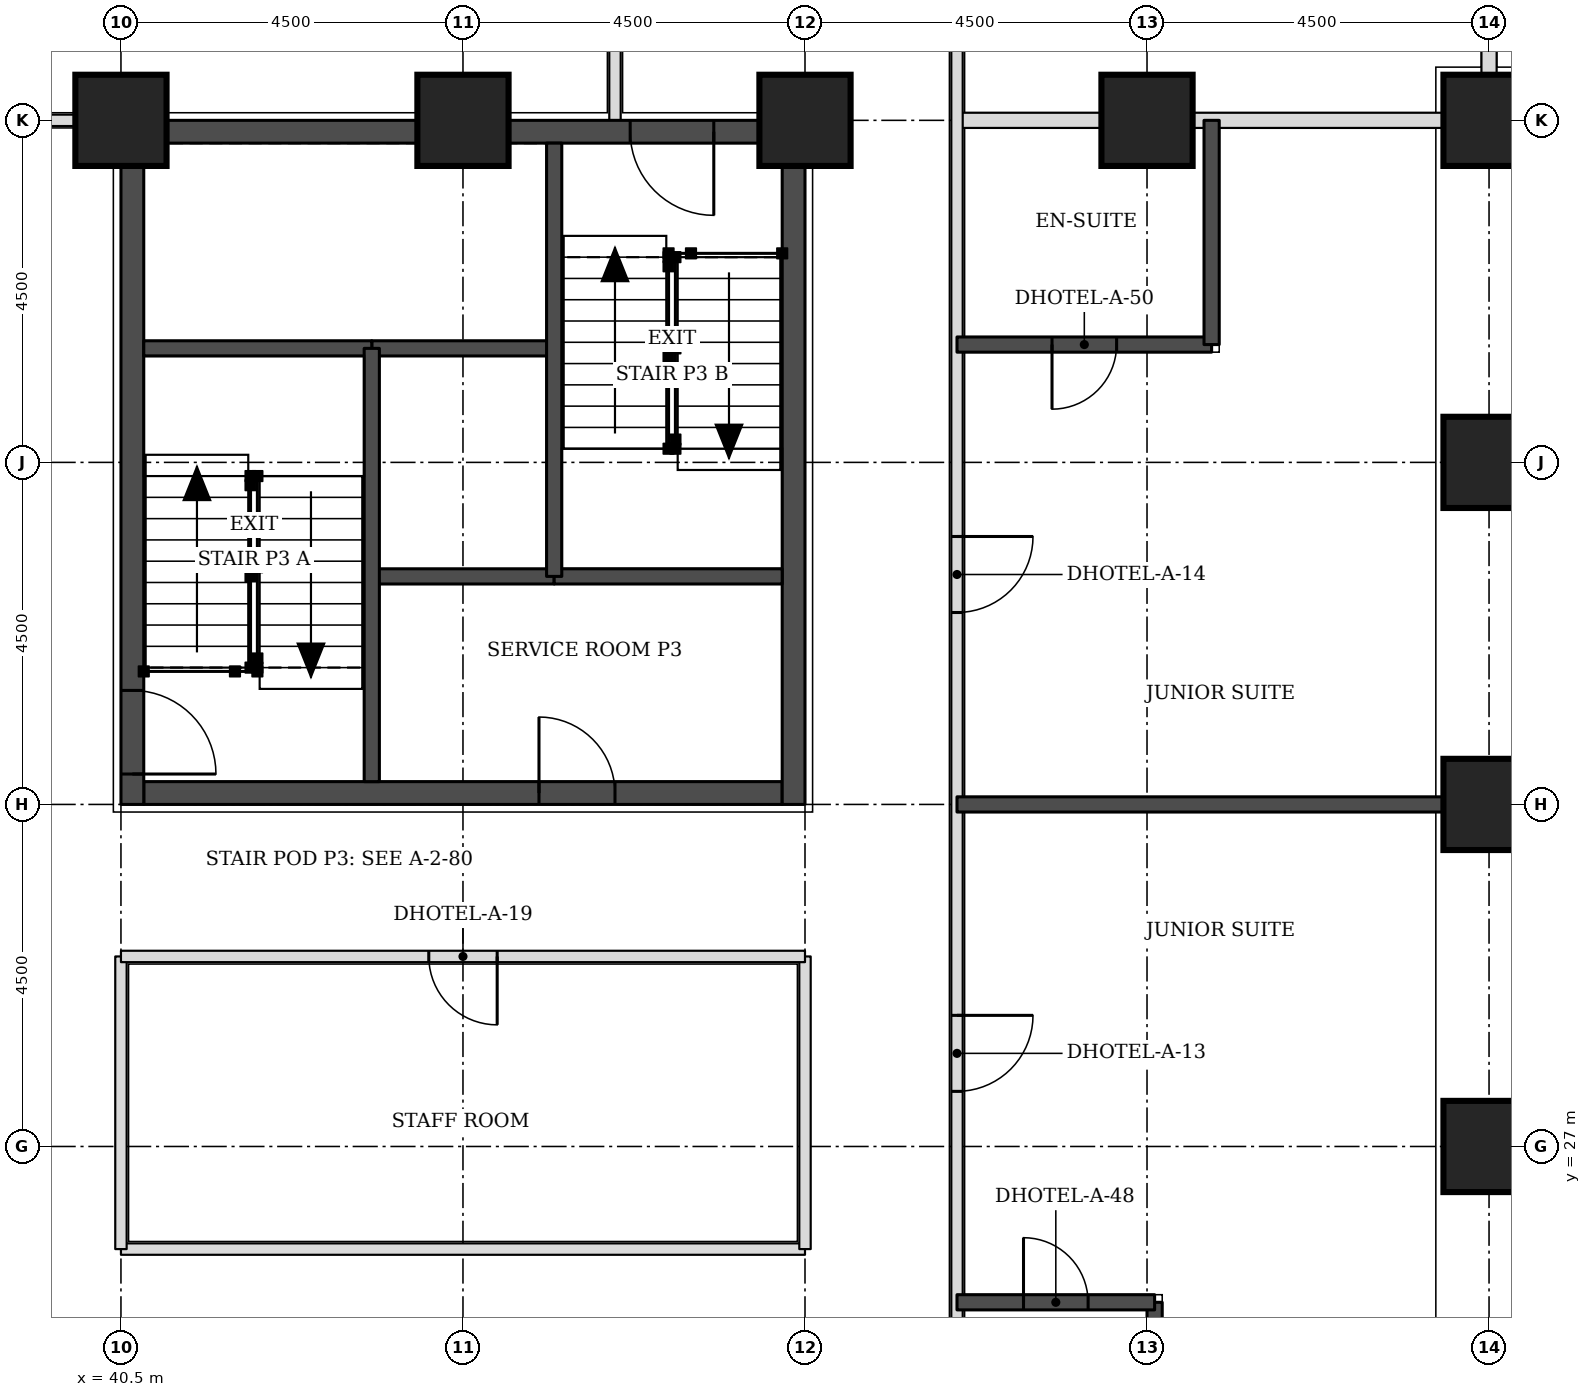
"""IFC4 building model, lengths in metres.
Left out: names, types, materials, properties, quantities, classifications, styles, units other than length and angle.
Written with IfcOpenShell. Run it as: python <this file> out.ifc"""

import sys

from ifc_helpers import new_model, si_unit, direction, frame, frame_2d, origin, origin_2d, place, context, subcontext, project, spatial, rectangle, extrude, element, fill, save


model = new_model("IFC4")
c1 = context("Model", 3, precision=1e-05, world=origin(), true_north=direction((0.0, 1.0)))
c2 = subcontext(c1, "Body", "Model", "MODEL_VIEW")
j1 = project(units=[si_unit("LENGTHUNIT", "METRE"), si_unit("PLANEANGLEUNIT", "RADIAN")], contexts=[c1])
p1 = place(None, origin())
s1 = spatial("IfcSite", under=j1, at=p1, CompositionType="ELEMENT")
p2 = place(p1, origin())
s2 = spatial("IfcBuilding", under=s1, at=p2, CompositionType="ELEMENT")
p3 = place(p2, frame((0.0, 0.0, 49.5)))
s3 = spatial("IfcBuildingStorey", under=s2, at=p3, CompositionType="ELEMENT", Elevation=49.5)
for number, where, z_axis, x_axis in (
    (1, (58.5, 27.0, 0.0), (0.0, 0.0, 1.0), (1.0, 0.0, 0.0)),
    (2, (58.5, 31.5, 0.0), (0.0, 0.0, 1.0), (1.0, 0.0, 0.0)),
    (3, (58.5, 36.0, 0.0), (0.0, 0.0, 1.0), (1.0, 0.0, 0.0)),
    (4, (40.5, 40.5, 0.0), (0.0, 0.0, 1.0), (1.0, 0.0, 0.0)),
    (5, (45.0, 40.5, 0.0), (0.0, 0.0, 1.0), (1.0, 0.0, 0.0)),
    (6, (49.5, 40.5, 0.0), (0.0, 0.0, 1.0), (1.0, 0.0, 0.0)),
    (7, (54.0, 40.5, 0.0), (0.0, 0.0, 1.0), (1.0, 0.0, 0.0)),
    (8, (58.5, 40.5, 0.0), (0.0, 0.0, 1.0), (1.0, 0.0, 0.0)),
):
    element("IfcColumn", number, at=place(p3, frame(where, z_axis=z_axis, x_axis=x_axis)), inside=s3, PredefinedType="COLUMN", context=c2, shape_type="SweptSolid", body=[
        extrude(rectangle(XDim=1.2, YDim=1.2, at=origin_2d()), origin(), (0.0, 0.0, 1.0), 3.3),
    ])
p4 = place(p3, frame((40.8, 31.65, 0.0), z_axis=(0.0, 0.0, 1.0), x_axis=(1.0, 0.0, 0.0)))
e9 = element("IfcWall", 9, at=p4, inside=s3, PredefinedType="SHEAR", context=c2, shape_type="SweptSolid", body=[
    extrude(rectangle(XDim=8.4, YDim=0.3, at=frame_2d((4.2, 0.0))), origin(), (0.0, 0.0, 1.0), 3.3),
])
p5 = place(p4, frame((5.2, 0.0, 0.0)))
e10 = element("IfcOpeningElement", 10, at=p5, cuts=e9, PredefinedType="OPENING", context=c2, shape_type="SweptSolid", body=[
    extrude(rectangle(XDim=1.0, YDim=2.1, at=frame_2d((0.5, 1.05))), frame((0.0, 0.16, 0.0), z_axis=(0.0, -1.0, 0.0), x_axis=(1.0, 0.0, 0.0)), (0.0, 0.0, 1.0), 0.32),
])
p6 = place(p3, frame((40.8, 40.35, 0.0), z_axis=(0.0, 0.0, 1.0), x_axis=(1.0, 0.0, 0.0)))
e11 = element("IfcWall", 11, at=p6, inside=s3, PredefinedType="SHEAR", context=c2, shape_type="SweptSolid", body=[
    extrude(rectangle(XDim=8.4, YDim=0.3, at=frame_2d((4.2, 0.0))), origin(), (0.0, 0.0, 1.0), 3.3),
])
p7 = place(p6, frame((6.4, 0.0, 0.0)))
e12 = element("IfcOpeningElement", 12, at=p7, cuts=e11, PredefinedType="OPENING", context=c2, shape_type="SweptSolid", body=[
    extrude(rectangle(XDim=1.1, YDim=2.1, at=frame_2d((0.55, 1.05))), frame((0.0, 0.16, 0.0), z_axis=(0.0, -1.0, 0.0), x_axis=(1.0, 0.0, 0.0)), (0.0, 0.0, 1.0), 0.32),
])
p8 = place(p3, frame((40.65, 31.5, 0.0), z_axis=(0.0, 0.0, 1.0), x_axis=(0.0, 1.0, 0.0)))
e13 = element("IfcWall", 13, at=p8, inside=s3, PredefinedType="SHEAR", context=c2, shape_type="SweptSolid", body=[
    extrude(rectangle(XDim=9.0, YDim=0.3, at=frame_2d((4.5, 0.0))), origin(), (0.0, 0.0, 1.0), 3.3),
])
p9 = place(p8, frame((0.4, 0.0, 0.0)))
e14 = element("IfcOpeningElement", 14, at=p9, cuts=e13, PredefinedType="OPENING", context=c2, shape_type="SweptSolid", body=[
    extrude(rectangle(XDim=1.1, YDim=2.1, at=frame_2d((0.55, 1.05))), frame((0.0, 0.16, 0.0), z_axis=(0.0, -1.0, 0.0), x_axis=(1.0, 0.0, 0.0)), (0.0, 0.0, 1.0), 0.32),
])
p10 = place(p3, frame((49.35, 31.5, 0.0), z_axis=(0.0, 0.0, 1.0), x_axis=(0.0, 1.0, 0.0)))
e15 = element("IfcWall", 15, at=p10, inside=s3, PredefinedType="SHEAR", context=c2, shape_type="SweptSolid", body=[
    extrude(rectangle(XDim=9.0, YDim=0.3, at=frame_2d((4.5, 0.0))), origin(), (0.0, 0.0, 1.0), 3.3),
])
p11 = place(p3, frame((51.5, 40.5, 0.0), z_axis=(0.0, 0.0, 1.0), x_axis=(1.0, 0.0, 0.0)))
e16 = element("IfcWall", 16, at=p11, inside=s3, PredefinedType="PARTITIONING", context=c2, shape_type="SweptSolid", body=[
    extrude(rectangle(XDim=6.4, YDim=0.2, at=frame_2d((3.2, 0.0))), origin(), (0.0, 0.0, 1.0), 2.33),
])
p12 = place(p3, frame((58.5, 41.1, 0.0), z_axis=(0.0, 0.0, 1.0), x_axis=(0.0, 1.0, 0.0)))
e17 = element("IfcWall", 17, at=p12, inside=s3, PredefinedType="PARTITIONING", context=c2, shape_type="SweptSolid", body=[
    extrude(rectangle(XDim=6.4, YDim=0.2, at=frame_2d((3.2, 0.0))), origin(), (0.0, 0.0, 1.0), 3.08),
])
p13 = place(p3, frame((51.5, 23.65, 0.0), z_axis=(0.0, 0.0, 1.0), x_axis=(0.0, 1.0, 0.0)))
e18 = element("IfcWall", 18, at=p13, inside=s3, PredefinedType="PARTITIONING", context=c2, shape_type="SweptSolid", body=[
    extrude(rectangle(XDim=23.85, YDim=0.15, at=frame_2d((11.925, 0.0))), origin(), (0.0, 0.0, 1.0), 3.08),
])
p14 = place(p13, frame((4.075, 0.0, 0.0)))
e19 = element("IfcOpeningElement", 19, at=p14, cuts=e18, PredefinedType="OPENING", context=c2, shape_type="SweptSolid", body=[
    extrude(rectangle(XDim=1.0, YDim=2.1, at=frame_2d((0.5, 1.05))), frame((0.0, 0.085, 0.0), z_axis=(0.0, -1.0, 0.0), x_axis=(1.0, 0.0, 0.0)), (0.0, 0.0, 1.0), 0.17),
])
p15 = place(p13, frame((10.375, 0.0, 0.0)))
e20 = element("IfcOpeningElement", 20, at=p15, cuts=e18, PredefinedType="OPENING", context=c2, shape_type="SweptSolid", body=[
    extrude(rectangle(XDim=1.0, YDim=2.1, at=frame_2d((0.5, 1.05))), frame((0.0, 0.085, 0.0), z_axis=(0.0, -1.0, 0.0), x_axis=(1.0, 0.0, 0.0)), (0.0, 0.0, 1.0), 0.17),
])
p16 = place(p13, frame((19.9, 0.0, 0.0)))
e21 = element("IfcOpeningElement", 21, at=p16, cuts=e18, PredefinedType="OPENING", context=c2, shape_type="SweptSolid", body=[
    extrude(rectangle(XDim=0.9, YDim=2.1, at=frame_2d((0.45, 1.05))), frame((0.0, 0.085, 0.0), z_axis=(0.0, -1.0, 0.0), x_axis=(1.0, 0.0, 0.0)), (0.0, 0.0, 1.0), 0.17),
])
p17 = place(p3, frame((40.5, 25.65, 0.0), z_axis=(0.0, 0.0, 1.0), x_axis=(1.0, 0.0, 0.0)))
e22 = element("IfcWall", 22, at=p17, inside=s3, PredefinedType="PARTITIONING", context=c2, shape_type="SweptSolid", body=[
    extrude(rectangle(XDim=9.0, YDim=0.15, at=frame_2d((4.5, 0.0))), origin(), (0.0, 0.0, 1.0), 3.08),
])
for number, where, z_axis, x_axis in (
    (23, (40.5, 25.65, 0.0), (0.0, 0.0, 1.0), (0.0, 1.0, 0.0)),
    (24, (49.5, 25.65, 0.0), (0.0, 0.0, 1.0), (0.0, 1.0, 0.0)),
):
    element("IfcWall", number, at=place(p3, frame(where, z_axis=z_axis, x_axis=x_axis)), inside=s3, PredefinedType="PARTITIONING", context=c2, shape_type="SweptSolid", body=[
        extrude(rectangle(XDim=3.85, YDim=0.15, at=frame_2d((1.925, 0.0))), origin(), (0.0, 0.0, 1.0), 3.08),
    ])
p18 = place(p3, frame((40.5, 29.5, 0.0), z_axis=(0.0, 0.0, 1.0), x_axis=(1.0, 0.0, 0.0)))
e25 = element("IfcWall", 25, at=p18, inside=s3, PredefinedType="PARTITIONING", context=c2, shape_type="SweptSolid", body=[
    extrude(rectangle(XDim=9.0, YDim=0.15, at=frame_2d((4.5, 0.0))), origin(), (0.0, 0.0, 1.0), 3.08),
])
p19 = place(p18, frame((4.05, 0.0, 0.0)))
e26 = element("IfcOpeningElement", 26, at=p19, cuts=e25, PredefinedType="OPENING", context=c2, shape_type="SweptSolid", body=[
    extrude(rectangle(XDim=0.9, YDim=2.1, at=frame_2d((0.45, 1.05))), frame((0.0, 0.085, 0.0), z_axis=(0.0, -1.0, 0.0), x_axis=(1.0, 0.0, 0.0)), (0.0, 0.0, 1.0), 0.17),
])
p20 = place(p3, frame((38.5, 40.5, 0.0), z_axis=(0.0, 0.0, 1.0), x_axis=(1.0, 0.0, 0.0)))
e27 = element("IfcWall", 27, at=p20, inside=s3, PredefinedType="PARTITIONING", context=c2, shape_type="SweptSolid", body=[
    extrude(rectangle(XDim=1.95, YDim=0.15, at=frame_2d((0.975, 0.0))), origin(), (0.0, 0.0, 1.0), 2.33),
])
p21 = place(p3, frame((47.0, 40.5, 0.0), z_axis=(0.0, 0.0, 1.0), x_axis=(0.0, 1.0, 0.0)))
e28 = element("IfcWall", 28, at=p21, inside=s3, PredefinedType="PARTITIONING", context=c2, shape_type="SweptSolid", body=[
    extrude(rectangle(XDim=7.0, YDim=0.15, at=frame_2d((3.5, 0.0))), origin(), (0.0, 0.0, 1.0), 3.08),
])
p22 = place(p21, frame((3.05, 0.0, 0.0)))
e29 = element("IfcOpeningElement", 29, at=p22, cuts=e28, PredefinedType="OPENING", context=c2, shape_type="SweptSolid", body=[
    extrude(rectangle(XDim=0.9, YDim=2.1, at=frame_2d((0.45, 1.05))), frame((0.0, 0.085, 0.0), z_axis=(0.0, -1.0, 0.0), x_axis=(1.0, 0.0, 0.0)), (0.0, 0.0, 1.0), 0.17),
])
p23 = place(p3, frame((54.1, 22.5, 0.0), z_axis=(0.0, 0.0, 1.0), x_axis=(0.0, 1.0, 0.0)))
e30 = element("IfcWall", 30, at=p23, inside=s3, PredefinedType="SOLIDWALL", context=c2, shape_type="SweptSolid", body=[
    extrude(rectangle(XDim=2.45, YDim=0.2, at=frame_2d((1.225, 0.0))), origin(), (0.0, 0.0, 1.0), 3.08),
])
p24 = place(p3, frame((51.5, 24.95, 0.0), z_axis=(0.0, 0.0, 1.0), x_axis=(1.0, 0.0, 0.0)))
e31 = element("IfcWall", 31, at=p24, inside=s3, PredefinedType="SOLIDWALL", context=c2, shape_type="SweptSolid", body=[
    extrude(rectangle(XDim=2.6, YDim=0.2, at=frame_2d((1.3, 0.0))), origin(), (0.0, 0.0, 1.0), 3.08),
])
p25 = place(p24, frame((0.875, 0.0, 0.0)))
e32 = element("IfcOpeningElement", 32, at=p25, cuts=e31, PredefinedType="OPENING", context=c2, shape_type="SweptSolid", body=[
    extrude(rectangle(XDim=0.85, YDim=2.1, at=frame_2d((0.425, 1.05))), frame((0.0, 0.11, 0.0), z_axis=(0.0, -1.0, 0.0), x_axis=(1.0, 0.0, 0.0)), (0.0, 0.0, 1.0), 0.22),
])
p26 = place(p3, frame((51.5, 31.5, 0.0), z_axis=(0.0, 0.0, 1.0), x_axis=(1.0, 0.0, 0.0)))
e33 = element("IfcWall", 33, at=p26, inside=s3, PredefinedType="SOLIDWALL", context=c2, shape_type="SweptSolid", body=[
    extrude(rectangle(XDim=6.4, YDim=0.2, at=frame_2d((3.2, 0.0))), origin(), (0.0, 0.0, 1.0), 3.08),
])
p27 = place(p3, frame((51.5, 37.55, 0.0), z_axis=(0.0, 0.0, 1.0), x_axis=(1.0, 0.0, 0.0)))
e34 = element("IfcWall", 34, at=p27, inside=s3, PredefinedType="SOLIDWALL", context=c2, shape_type="SweptSolid", body=[
    extrude(rectangle(XDim=3.35, YDim=0.2, at=frame_2d((1.675, 0.0))), origin(), (0.0, 0.0, 1.0), 3.08),
])
p28 = place(p27, frame((1.25, 0.0, 0.0)))
e35 = element("IfcOpeningElement", 35, at=p28, cuts=e34, PredefinedType="OPENING", context=c2, shape_type="SweptSolid", body=[
    extrude(rectangle(XDim=0.85, YDim=2.1, at=frame_2d((0.425, 1.05))), frame((0.0, 0.11, 0.0), z_axis=(0.0, -1.0, 0.0), x_axis=(1.0, 0.0, 0.0)), (0.0, 0.0, 1.0), 0.22),
])
p29 = place(p3, frame((54.85, 37.55, 0.0), z_axis=(0.0, 0.0, 1.0), x_axis=(0.0, 1.0, 0.0)))
e36 = element("IfcWall", 36, at=p29, inside=s3, PredefinedType="SOLIDWALL", context=c2, shape_type="SweptSolid", body=[
    extrude(rectangle(XDim=2.95, YDim=0.2, at=frame_2d((1.475, 0.0))), origin(), (0.0, 0.0, 1.0), 3.08),
])
p30 = place(p3, frame((43.8, 34.5, 0.0), z_axis=(0.0, 0.0, 1.0), x_axis=(1.0, 0.0, 0.0)))
e37 = element("IfcWall", 37, at=p30, inside=s3, PredefinedType="SOLIDWALL", context=c2, shape_type="SweptSolid", body=[
    extrude(rectangle(XDim=2.4, YDim=0.2, at=frame_2d((1.2, 0.0))), origin(), (0.0, 0.0, 1.0), 3.08),
])
p31 = place(p3, frame((46.2, 34.5, 0.0), z_axis=(0.0, 0.0, 1.0), x_axis=(1.0, 0.0, 0.0)))
e38 = element("IfcWall", 38, at=p31, inside=s3, PredefinedType="SOLIDWALL", context=c2, shape_type="SweptSolid", body=[
    extrude(rectangle(XDim=3.0, YDim=0.2, at=frame_2d((1.5, 0.0))), origin(), (0.0, 0.0, 1.0), 3.08),
])
p32 = place(p3, frame((43.8, 37.5, 0.0), z_axis=(0.0, 0.0, 1.0), x_axis=(1.0, 0.0, 0.0)))
e39 = element("IfcWall", 39, at=p32, inside=s3, PredefinedType="SOLIDWALL", context=c2, shape_type="SweptSolid", body=[
    extrude(rectangle(XDim=2.4, YDim=0.2, at=frame_2d((1.2, 0.0))), origin(), (0.0, 0.0, 1.0), 3.3),
])
p33 = place(p3, frame((40.8, 37.5, 0.0), z_axis=(0.0, 0.0, 1.0), x_axis=(1.0, 0.0, 0.0)))
e40 = element("IfcWall", 40, at=p33, inside=s3, PredefinedType="SOLIDWALL", context=c2, shape_type="SweptSolid", body=[
    extrude(rectangle(XDim=3.0, YDim=0.2, at=frame_2d((1.5, 0.0))), origin(), (0.0, 0.0, 1.0), 3.08),
])
for number, where, z_axis, x_axis in (
    (41, (43.8, 31.8, 0.0), (0.0, 0.0, 1.0), (0.0, 1.0, 0.0)),
    (42, (46.2, 34.5, 0.0), (0.0, 0.0, 1.0), (0.0, 1.0, 0.0)),
):
    element("IfcWall", number, at=place(p3, frame(where, z_axis=z_axis, x_axis=x_axis)), inside=s3, PredefinedType="SOLIDWALL", context=c2, shape_type="SweptSolid", body=[
        extrude(rectangle(XDim=5.7, YDim=0.2, at=frame_2d((2.85, 0.0))), origin(), (0.0, 0.0, 1.0), 3.08),
    ])
p34 = place(p14, frame((1.0, 0.0, 0.0), z_axis=(0.0, 0.0, 1.0), x_axis=(-1.0, 0.0, 0.0)))
e43 = element("IfcDoor", 43, at=p34, inside=s3, OperationType="SINGLE_SWING_LEFT", PredefinedType="DOOR", context=c2, shape_type="SweptSolid", body=[
    extrude(rectangle(XDim=1.0, YDim=2.1, at=frame_2d((0.5, 1.05))), frame((0.0, 0.025, 0.0), z_axis=(0.0, -1.0, 0.0), x_axis=(1.0, 0.0, 0.0)), (0.0, 0.0, 1.0), 0.05),
])
fill(e19, e43)
p35 = place(p25, origin())
e44 = element("IfcDoor", 44, at=p35, inside=s3, OperationType="SINGLE_SWING_LEFT", PredefinedType="DOOR", context=c2, shape_type="SweptSolid", body=[
    extrude(rectangle(XDim=0.85, YDim=2.1, at=frame_2d((0.425, 1.05))), frame((0.0, 0.025, 0.0), z_axis=(0.0, -1.0, 0.0), x_axis=(1.0, 0.0, 0.0)), (0.0, 0.0, 1.0), 0.05),
])
fill(e32, e44)
p36 = place(p15, frame((1.0, 0.0, 0.0), z_axis=(0.0, 0.0, 1.0), x_axis=(-1.0, 0.0, 0.0)))
e45 = element("IfcDoor", 45, at=p36, inside=s3, OperationType="SINGLE_SWING_LEFT", PredefinedType="DOOR", context=c2, shape_type="SweptSolid", body=[
    extrude(rectangle(XDim=1.0, YDim=2.1, at=frame_2d((0.5, 1.05))), frame((0.0, 0.025, 0.0), z_axis=(0.0, -1.0, 0.0), x_axis=(1.0, 0.0, 0.0)), (0.0, 0.0, 1.0), 0.05),
])
fill(e20, e45)
p37 = place(p28, frame((0.85, 0.0, 0.0), z_axis=(0.0, 0.0, 1.0), x_axis=(-1.0, 0.0, 0.0)))
e46 = element("IfcDoor", 46, at=p37, inside=s3, OperationType="SINGLE_SWING_RIGHT", PredefinedType="DOOR", context=c2, shape_type="SweptSolid", body=[
    extrude(rectangle(XDim=0.85, YDim=2.1, at=frame_2d((0.425, 1.05))), frame((0.0, 0.025, 0.0), z_axis=(0.0, -1.0, 0.0), x_axis=(1.0, 0.0, 0.0)), (0.0, 0.0, 1.0), 0.05),
])
fill(e35, e46)
p38 = place(p19, frame((0.9, 0.0, 0.0), z_axis=(0.0, 0.0, 1.0), x_axis=(-1.0, 0.0, 0.0)))
e47 = element("IfcDoor", 47, at=p38, inside=s3, OperationType="SINGLE_SWING_LEFT", PredefinedType="DOOR", context=c2, shape_type="SweptSolid", body=[
    extrude(rectangle(XDim=0.9, YDim=2.1, at=frame_2d((0.45, 1.05))), frame((0.0, 0.025, 0.0), z_axis=(0.0, -1.0, 0.0), x_axis=(1.0, 0.0, 0.0)), (0.0, 0.0, 1.0), 0.05),
])
fill(e26, e47)
p39 = place(p9, frame((1.1, 0.0, 0.0), z_axis=(0.0, 0.0, 1.0), x_axis=(-1.0, 0.0, 0.0)))
e48 = element("IfcDoor", 48, at=p39, inside=s3, OperationType="SINGLE_SWING_RIGHT", PredefinedType="DOOR", context=c2, shape_type="SweptSolid", body=[
    extrude(rectangle(XDim=1.1, YDim=2.1, at=frame_2d((0.55, 1.05))), frame((0.0, 0.025, 0.0), z_axis=(0.0, -1.0, 0.0), x_axis=(1.0, 0.0, 0.0)), (0.0, 0.0, 1.0), 0.05),
])
fill(e14, e48)
p40 = place(p7, frame((1.1, 0.0, 0.0), z_axis=(0.0, 0.0, 1.0), x_axis=(-1.0, 0.0, 0.0)))
e49 = element("IfcDoor", 49, at=p40, inside=s3, OperationType="SINGLE_SWING_LEFT", PredefinedType="DOOR", context=c2, shape_type="SweptSolid", body=[
    extrude(rectangle(XDim=1.1, YDim=2.1, at=frame_2d((0.55, 1.05))), frame((0.0, 0.025, 0.0), z_axis=(0.0, -1.0, 0.0), x_axis=(1.0, 0.0, 0.0)), (0.0, 0.0, 1.0), 0.05),
])
fill(e12, e49)
p41 = place(p5, origin())
e50 = element("IfcDoor", 50, at=p41, inside=s3, OperationType="SINGLE_SWING_LEFT", PredefinedType="DOOR", context=c2, shape_type="SweptSolid", body=[
    extrude(rectangle(XDim=1.0, YDim=2.1, at=frame_2d((0.5, 1.05))), frame((0.0, 0.025, 0.0), z_axis=(0.0, -1.0, 0.0), x_axis=(1.0, 0.0, 0.0)), (0.0, 0.0, 1.0), 0.05),
])
fill(e10, e50)
save(model, sys.argv[1])
